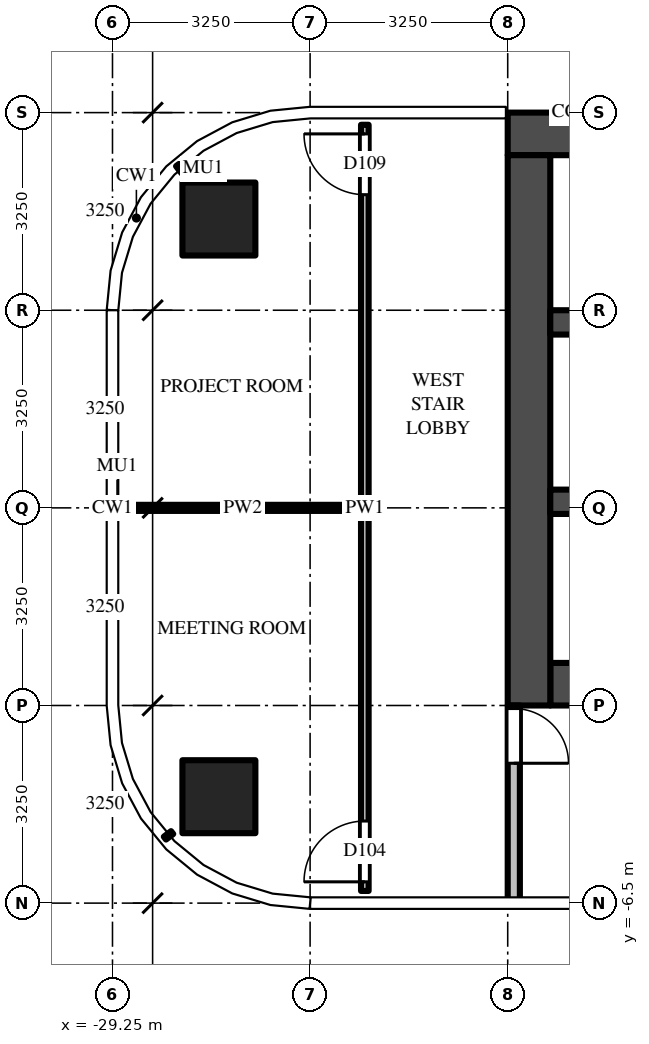
"""IFC4 building model, lengths in metres.
Left out: names, types, materials, properties, quantities, classifications, styles, units other than length and angle.
Written with IfcOpenShell. Run it as: python <this file> out.ifc"""

import sys

from ifc_helpers import new_model, si_unit, direction, frame, frame_2d, origin, origin_2d, place, context, subcontext, project, spatial, rectangle, extrude, source, transform, mapped, element, fill, save


model = new_model("IFC4")
c1 = context("Model", 3, precision=1e-05, world=origin(), true_north=direction((0.0, 1.0)))
c2 = subcontext(c1, "Body", "Model", "MODEL_VIEW")
j1 = project(units=[si_unit("LENGTHUNIT", "METRE"), si_unit("PLANEANGLEUNIT", "RADIAN")], contexts=[c1])
p1 = place(None, origin())
s1 = spatial("IfcSite", under=j1, at=p1, CompositionType="ELEMENT")
p2 = place(p1, origin())
s2 = spatial("IfcBuilding", under=s1, at=p2, CompositionType="ELEMENT")
p3 = place(p2, frame((0.0, 0.0, 197.1)))
s3 = spatial("IfcBuildingStorey", under=s2, at=p3, CompositionType="ELEMENT", Elevation=197.1)
m1 = source(origin(), c2, "Body", "SweptSolid", [
    extrude(rectangle(XDim=1.2, YDim=1.2, at=origin_2d()), origin(), (0.0, 0.0, 1.0), 3.9),
])
for number, where, z_axis, x_axis in (
    (1, (-27.5, -4.75, 0.0), (0.0, 0.0, 1.0), (1.0, 0.0, 0.0)),
    (2, (-27.5, 4.75, 0.0), (0.0, 0.0, 1.0), (1.0, 0.0, 0.0)),
):
    element("IfcColumn", number, at=place(p3, frame(where, z_axis=z_axis, x_axis=x_axis)), inside=s3, PredefinedType="COLUMN", context=c2, shape_type="MappedRepresentation", body=[
        mapped(m1, transform((0.0, 0.0, 0.0))),
    ])
m2 = source(origin(), c2, "Body", "SweptSolid", [
    extrude(rectangle(XDim=16.55, YDim=0.7, at=frame_2d((8.275, 0.0))), origin(), (0.0, 0.0, 1.0), 3.7),
])
p4 = place(p3, frame((-6.2, 6.15, 0.0), z_axis=(0.0, 0.0, 1.0), x_axis=(-1.0, 0.0, 0.0)))
e3 = element("IfcWall", 3, at=p4, inside=s3, PredefinedType="SHEAR", context=c2, shape_type="MappedRepresentation", body=[
    mapped(m2, transform((0.0, 0.0, 0.0))),
])
m3 = source(origin(), c2, "Body", "SweptSolid", [
    extrude(rectangle(XDim=14.85, YDim=0.7, at=frame_2d((7.425, 0.0))), origin(), (0.0, 0.0, 1.0), 3.7),
])
p5 = place(p3, frame((-7.2, -2.9, 0.0), z_axis=(0.0, 0.0, 1.0), x_axis=(-1.0, 0.0, 0.0)))
e4 = element("IfcWall", 4, at=p5, inside=s3, PredefinedType="SHEAR", context=c2, shape_type="MappedRepresentation", body=[
    mapped(m3, transform((0.0, 0.0, 0.0))),
])
m4 = source(origin(), c2, "Body", "SweptSolid", [
    extrude(rectangle(XDim=1.1, YDim=2.1, at=frame_2d((0.55, 1.05))), frame((0.0, 0.36, 0.0), z_axis=(0.0, -1.0, 0.0), x_axis=(1.0, 0.0, 0.0)), (0.0, 0.0, 1.0), 0.72),
])
p6 = place(p5, frame((0.55, 0.0, 0.0)))
e5 = element("IfcOpeningElement", 5, at=p6, cuts=e4, PredefinedType="OPENING", context=c2, shape_type="MappedRepresentation", body=[
    mapped(m4, transform((0.0, 0.0, 0.0))),
])
p7 = place(p5, frame((3.15, 0.0, 0.0)))
e6 = element("IfcOpeningElement", 6, at=p7, cuts=e4, PredefinedType="OPENING", context=c2, shape_type="MappedRepresentation", body=[
    mapped(m4, transform((0.0, 0.0, 0.0))),
])
m5 = source(origin(), c2, "Body", "SweptSolid", [
    extrude(rectangle(XDim=1.2, YDim=2.1, at=frame_2d((0.6, 1.05))), frame((0.0, 0.36, 0.0), z_axis=(0.0, -1.0, 0.0), x_axis=(1.0, 0.0, 0.0)), (0.0, 0.0, 1.0), 0.72),
])
p8 = place(p5, frame((5.7, 0.0, 0.0)))
e7 = element("IfcOpeningElement", 7, at=p8, cuts=e4, PredefinedType="OPENING", context=c2, shape_type="MappedRepresentation", body=[
    mapped(m5, transform((0.0, 0.0, 0.0))),
])
m6 = source(origin(), c2, "Body", "SweptSolid", [
    extrude(rectangle(XDim=1.3, YDim=2.1, at=frame_2d((0.65, 1.05))), frame((0.0, 0.36, 0.0), z_axis=(0.0, -1.0, 0.0), x_axis=(1.0, 0.0, 0.0)), (0.0, 0.0, 1.0), 0.72),
])
p9 = place(p5, frame((12.2, 0.0, 0.0)))
e8 = element("IfcOpeningElement", 8, at=p9, cuts=e4, PredefinedType="OPENING", context=c2, shape_type="MappedRepresentation", body=[
    mapped(m6, transform((0.0, 0.0, 0.0))),
])
p10 = place(p5, frame((9.85, 0.0, 0.0)))
e9 = element("IfcOpeningElement", 9, at=p10, cuts=e4, PredefinedType="OPENING", context=c2, shape_type="MappedRepresentation", body=[
    mapped(m5, transform((0.0, 0.0, 0.0))),
])
m7 = source(origin(), c2, "Body", "SweptSolid", [
    extrude(rectangle(XDim=1.0, YDim=2.1, at=frame_2d((0.5, 1.05))), frame((0.0, 0.36, 0.0), z_axis=(0.0, -1.0, 0.0), x_axis=(1.0, 0.0, 0.0)), (0.0, 0.0, 1.0), 0.72),
])
p11 = place(p5, frame((7.9, 0.0, 0.0)))
e10 = element("IfcOpeningElement", 10, at=p11, cuts=e4, PredefinedType="OPENING", context=c2, shape_type="MappedRepresentation", body=[
    mapped(m7, transform((0.0, 0.0, 0.0))),
])
m8 = source(origin(), c2, "Body", "SweptSolid", [
    extrude(rectangle(XDim=9.05, YDim=0.7, at=frame_2d((4.525, 0.0))), origin(), (0.0, 0.0, 1.0), 3.7),
])
p12 = place(p3, frame((-22.4, 5.8, 0.0), z_axis=(0.0, 0.0, 1.0), x_axis=(0.0, -1.0, 0.0)))
e11 = element("IfcWall", 11, at=p12, inside=s3, PredefinedType="SHEAR", context=c2, shape_type="MappedRepresentation", body=[
    mapped(m8, transform((0.0, 0.0, 0.0))),
])
m9 = source(origin(), c2, "Body", "SweptSolid", [
    extrude(rectangle(XDim=14.85, YDim=0.4, at=frame_2d((7.425, 0.0))), origin(), (0.0, 0.0, 1.0), 3.7),
])
p13 = place(p3, frame((-7.2, 0.1, 0.0), z_axis=(0.0, 0.0, 1.0), x_axis=(-1.0, 0.0, 0.0)))
e12 = element("IfcWall", 12, at=p13, inside=s3, PredefinedType="SHEAR", context=c2, shape_type="MappedRepresentation", body=[
    mapped(m9, transform((0.0, 0.0, 0.0))),
])
m10 = source(origin(), c2, "Body", "SweptSolid", [
    extrude(rectangle(XDim=1.0, YDim=2.1, at=frame_2d((0.5, 1.05))), frame((0.0, 0.21, 0.0), z_axis=(0.0, -1.0, 0.0), x_axis=(1.0, 0.0, 0.0)), (0.0, 0.0, 1.0), 0.42),
])
p14 = place(p13, frame((7.9, 0.0, 0.0)))
e13 = element("IfcOpeningElement", 13, at=p14, cuts=e12, PredefinedType="OPENING", context=c2, shape_type="MappedRepresentation", body=[
    mapped(m10, transform((0.0, 0.0, 0.0))),
])
m11 = source(origin(), c2, "Body", "SweptSolid", [
    extrude(rectangle(XDim=5.7, YDim=0.4, at=frame_2d((2.85, 0.0))), origin(), (0.0, 0.0, 1.0), 3.7),
])
p15 = place(p3, frame((-16.35, 3.05, 0.0), z_axis=(0.0, 0.0, 1.0), x_axis=(-1.0, 0.0, 0.0)))
e14 = element("IfcWall", 14, at=p15, inside=s3, PredefinedType="SHEAR", context=c2, shape_type="MappedRepresentation", body=[
    mapped(m11, transform((0.0, 0.0, 0.0))),
])
m12 = source(origin(), c2, "Body", "SweptSolid", [
    extrude(rectangle(XDim=3.25, YDim=0.2, at=frame_2d((1.625, 0.0))), origin(), (0.0, 0.0, 1.0), 3.7),
])
p16 = place(p3, frame((-22.65, -3.25, 0.0), z_axis=(0.0, 0.0, 1.0), x_axis=(0.0, -1.0, 0.0)))
e15 = element("IfcWall", 15, at=p16, inside=s3, PredefinedType="PARTITIONING", context=c2, shape_type="MappedRepresentation", body=[
    mapped(m12, transform((0.0, 0.0, 0.0))),
])
m13 = source(origin(), c2, "Body", "SweptSolid", [
    extrude(rectangle(XDim=0.9, YDim=2.1, at=frame_2d((0.45, 1.05))), frame((0.0, 0.11, 0.0), z_axis=(0.0, -1.0, 0.0), x_axis=(1.0, 0.0, 0.0)), (0.0, 0.0, 1.0), 0.22),
])
p17 = place(p16, frame((0.05, 0.0, 0.0)))
e16 = element("IfcOpeningElement", 16, at=p17, cuts=e15, PredefinedType="OPENING", context=c2, shape_type="MappedRepresentation", body=[
    mapped(m13, transform((0.0, 0.0, 0.0))),
])
m14 = source(origin(), c2, "Body", "SweptSolid", [
    extrude(rectangle(XDim=12.6, YDim=0.125, at=frame_2d((6.3, 0.0))), origin(), (0.0, 0.0, 1.0), 2.78),
])
p18 = place(p3, frame((-25.1, -6.3, 0.0), z_axis=(0.0, 0.0, 1.0), x_axis=(0.0, 1.0, 0.0)))
e17 = element("IfcWall", 17, at=p18, inside=s3, PredefinedType="PARTITIONING", context=c2, shape_type="MappedRepresentation", body=[
    mapped(m14, transform((0.0, 0.0, 0.0))),
])
m15 = source(origin(), c2, "Body", "SweptSolid", [
    extrude(rectangle(XDim=1.0, YDim=2.1, at=frame_2d((0.5, 1.05))), frame((0.0, 0.073, 0.0), z_axis=(0.0, -1.0, 0.0), x_axis=(1.0, 0.0, 0.0)), (0.0, 0.0, 1.0), 0.145),
])
p19 = place(p18, frame((0.15, 0.0, 0.0)))
e18 = element("IfcOpeningElement", 18, at=p19, cuts=e17, PredefinedType="OPENING", context=c2, shape_type="MappedRepresentation", body=[
    mapped(m15, transform((0.0, 0.0, 0.0))),
])
p20 = place(p18, frame((11.45, 0.0, 0.0)))
e19 = element("IfcOpeningElement", 19, at=p20, cuts=e17, PredefinedType="OPENING", context=c2, shape_type="MappedRepresentation", body=[
    mapped(m15, transform((0.0, 0.0, 0.0))),
])
m16 = source(origin(), c2, "Body", "SweptSolid", [
    extrude(rectangle(XDim=3.887, YDim=0.1, at=frame_2d((1.944, 0.0))), origin(), (0.0, 0.0, 1.0), 2.78),
])
p21 = place(p3, frame((-29.05, 0.0, 0.0), z_axis=(0.0, 0.0, 1.0), x_axis=(1.0, 0.0, 0.0)))
e20 = element("IfcWall", 20, at=p21, inside=s3, PredefinedType="PARTITIONING", context=c2, shape_type="MappedRepresentation", body=[
    mapped(m16, transform((0.0, 0.0, 0.0))),
])
m17 = source(origin(), c2, "Body", "SweptSolid", [
    extrude(rectangle(XDim=0.9, YDim=2.1, at=frame_2d((0.45, 1.05))), frame((0.0, 0.025, 0.0), z_axis=(0.0, -1.0, 0.0), x_axis=(1.0, 0.0, 0.0)), (0.0, 0.0, 1.0), 0.05),
])
p22 = place(p17, origin())
e21 = element("IfcDoor", 21, at=p22, inside=s3, OperationType="SINGLE_SWING_RIGHT", PredefinedType="DOOR", context=c2, shape_type="MappedRepresentation", body=[
    mapped(m17, transform((0.0, 0.0, 0.0))),
])
fill(e16, e21)
m18 = source(origin(), c2, "Body", "SweptSolid", [
    extrude(rectangle(XDim=1.0, YDim=2.1, at=frame_2d((0.5, 1.05))), frame((0.0, 0.025, 0.0), z_axis=(0.0, -1.0, 0.0), x_axis=(1.0, 0.0, 0.0)), (0.0, 0.0, 1.0), 0.05),
])
p23 = place(p19, origin())
e22 = element("IfcDoor", 22, at=p23, inside=s3, OperationType="SINGLE_SWING_LEFT", PredefinedType="DOOR", context=c2, shape_type="MappedRepresentation", body=[
    mapped(m18, transform((0.0, 0.0, 0.0))),
])
fill(e18, e22)
p24 = place(p20, origin())
e23 = element("IfcDoor", 23, at=p24, inside=s3, OperationType="SINGLE_SWING_RIGHT", PredefinedType="DOOR", context=c2, shape_type="MappedRepresentation", body=[
    mapped(m18, transform((0.0, 0.0, 0.0))),
])
fill(e19, e23)
save(model, sys.argv[1])
